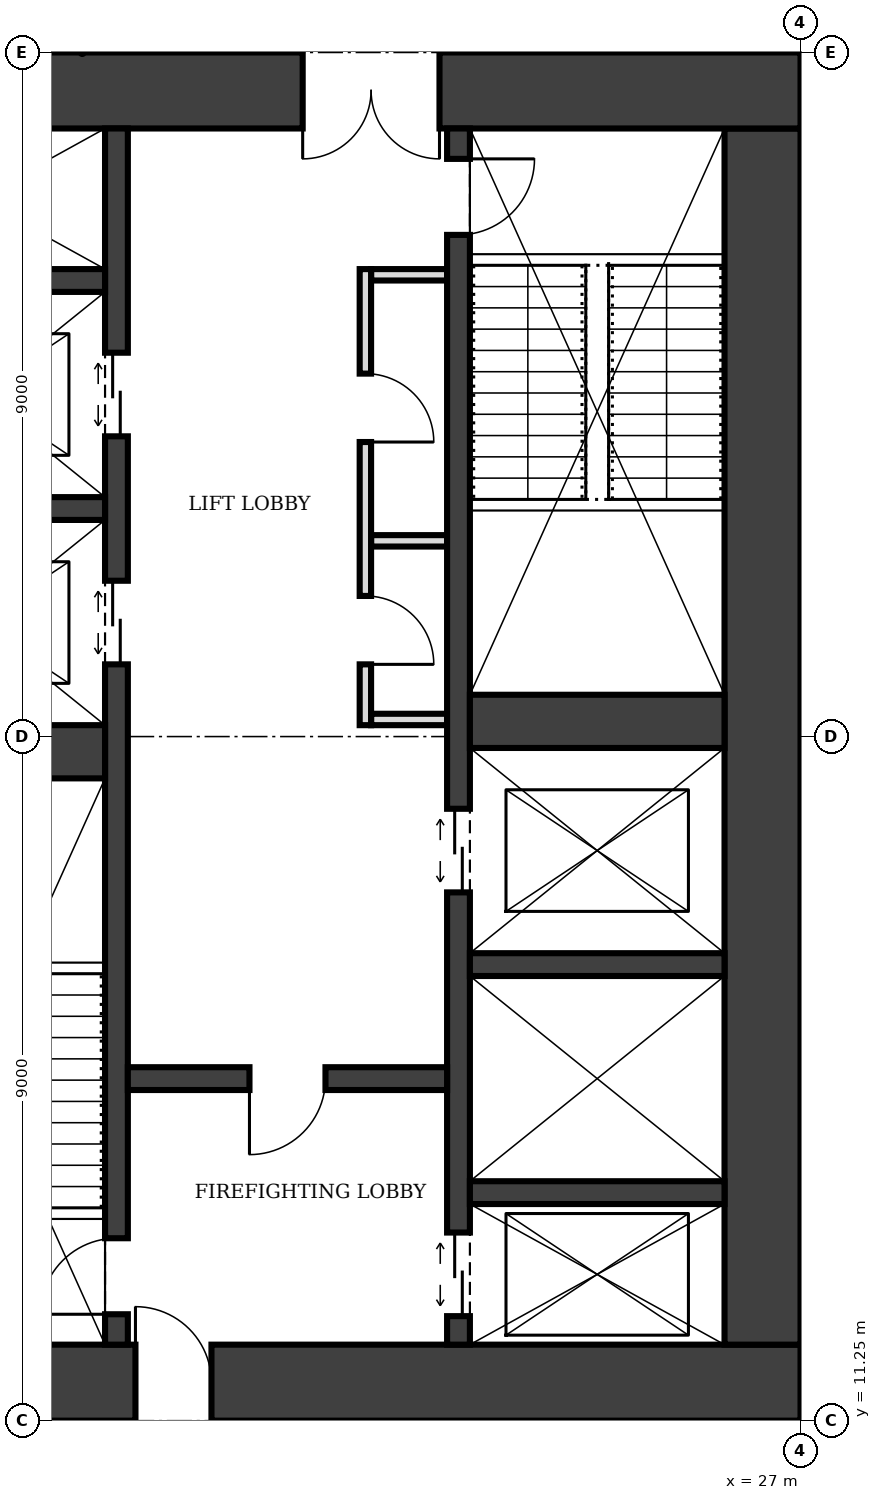
"""IFC4 building model, lengths in metres.
Left out: names, types, materials, properties, quantities, classifications, styles, units other than length and angle.
Written with IfcOpenShell. Run it as: python <this file> out.ifc"""

import sys

from ifc_helpers import new_model, si_unit, direction, frame, frame_2d, origin, place, context, subcontext, project, spatial, rectangle, extrude, element, fill, save


model = new_model("IFC4")
c1 = context("Model", 3, precision=1e-05, world=origin(), true_north=direction((0.0, 1.0)))
c2 = subcontext(c1, "Body", "Model", "MODEL_VIEW")
j1 = project(units=[si_unit("LENGTHUNIT", "METRE"), si_unit("PLANEANGLEUNIT", "RADIAN")], contexts=[c1])
p1 = place(None, origin())
s1 = spatial("IfcSite", under=j1, at=p1, CompositionType="ELEMENT")
p2 = place(p1, origin())
s2 = spatial("IfcBuilding", under=s1, at=p2, CompositionType="ELEMENT")
p3 = place(p2, frame((0.0, 0.0, 45.0)))
s3 = spatial("IfcBuildingStorey", under=s2, at=p3, CompositionType="ELEMENT", Elevation=45.0)
p4 = place(p3, frame((13.5, 11.75, 0.0), z_axis=(0.0, 0.0, 1.0), x_axis=(1.0, 0.0, 0.0)))
e1 = element("IfcWall", 1, at=p4, inside=s3, PredefinedType="SHEAR", context=c2, shape_type="SweptSolid", body=[
    extrude(rectangle(XDim=13.5, YDim=1.0, at=frame_2d((6.75, 0.0))), origin(), (0.0, 0.0, 1.0), 4.0),
])
p5 = place(p4, frame((4.75, 0.0, 0.0)))
e2 = element("IfcOpeningElement", 2, at=p5, cuts=e1, PredefinedType="OPENING", context=c2, shape_type="SweptSolid", body=[
    extrude(rectangle(XDim=1.0, YDim=2.1, at=frame_2d((0.5, 1.05))), frame((0.0, 0.51, 0.0), z_axis=(0.0, -1.0, 0.0), x_axis=(1.0, 0.0, 0.0)), (0.0, 0.0, 1.0), 1.02),
])
p6 = place(p3, frame((26.5, 12.25, 0.0), z_axis=(0.0, 0.0, 1.0), x_axis=(0.0, 1.0, 0.0)))
e3 = element("IfcWall", 3, at=p6, inside=s3, PredefinedType="SHEAR", context=c2, shape_type="SweptSolid", body=[
    extrude(rectangle(XDim=16.0, YDim=1.0, at=frame_2d((8.0, 0.0))), origin(), (0.0, 0.0, 1.0), 4.0),
])
p7 = place(p3, frame((27.0, 28.75, 0.0), z_axis=(0.0, 0.0, 1.0), x_axis=(-1.0, 0.0, 0.0)))
e4 = element("IfcWall", 4, at=p7, inside=s3, PredefinedType="SHEAR", context=c2, shape_type="SweptSolid", body=[
    extrude(rectangle(XDim=13.5, YDim=1.0, at=frame_2d((6.75, 0.0))), origin(), (0.0, 0.0, 1.0), 4.0),
])
p8 = place(p7, frame((4.75, 0.0, 0.0)))
e5 = element("IfcOpeningElement", 5, at=p8, cuts=e4, PredefinedType="OPENING", context=c2, shape_type="SweptSolid", body=[
    extrude(rectangle(XDim=1.8, YDim=2.1, at=frame_2d((0.9, 1.05))), frame((0.0, 0.51, 0.0), z_axis=(0.0, -1.0, 0.0), x_axis=(1.0, 0.0, 0.0)), (0.0, 0.0, 1.0), 1.02),
])
p9 = place(p3, frame((18.0, 12.25, 0.0), z_axis=(0.0, 0.0, 1.0), x_axis=(0.0, 1.0, 0.0)))
e6 = element("IfcWall", 6, at=p9, inside=s3, PredefinedType="SHEAR", context=c2, shape_type="SweptSolid", body=[
    extrude(rectangle(XDim=16.0, YDim=0.3, at=frame_2d((8.0, 0.0))), origin(), (0.0, 0.0, 1.0), 4.0),
])
p10 = place(p9, frame((0.4, 0.0, 0.0)))
e7 = element("IfcOpeningElement", 7, at=p10, cuts=e6, PredefinedType="OPENING", context=c2, shape_type="SweptSolid", body=[
    extrude(rectangle(XDim=1.0, YDim=2.1, at=frame_2d((0.5, 1.05))), frame((0.0, 0.16, 0.0), z_axis=(0.0, -1.0, 0.0), x_axis=(1.0, 0.0, 0.0)), (0.0, 0.0, 1.0), 0.32),
])
p11 = place(p9, frame((8.95, 0.0, 0.0)))
e8 = element("IfcOpeningElement", 8, at=p11, cuts=e6, PredefinedType="OPENING", context=c2, shape_type="SweptSolid", body=[
    extrude(rectangle(XDim=1.1, YDim=2.1, at=frame_2d((0.55, 1.05))), frame((0.0, 0.16, 0.0), z_axis=(0.0, -1.0, 0.0), x_axis=(1.0, 0.0, 0.0)), (0.0, 0.0, 1.0), 0.32),
])
p12 = place(p9, frame((11.95, 0.0, 0.0)))
e9 = element("IfcOpeningElement", 9, at=p12, cuts=e6, PredefinedType="OPENING", context=c2, shape_type="SweptSolid", body=[
    extrude(rectangle(XDim=1.1, YDim=2.1, at=frame_2d((0.55, 1.05))), frame((0.0, 0.16, 0.0), z_axis=(0.0, -1.0, 0.0), x_axis=(1.0, 0.0, 0.0)), (0.0, 0.0, 1.0), 0.32),
])
p13 = place(p3, frame((22.5, 12.25, 0.0), z_axis=(0.0, 0.0, 1.0), x_axis=(0.0, 1.0, 0.0)))
e10 = element("IfcWall", 10, at=p13, inside=s3, PredefinedType="SHEAR", context=c2, shape_type="SweptSolid", body=[
    extrude(rectangle(XDim=16.0, YDim=0.3, at=frame_2d((8.0, 0.0))), origin(), (0.0, 0.0, 1.0), 4.0),
])
p14 = place(p13, frame((14.6, 0.0, 0.0)))
e11 = element("IfcOpeningElement", 11, at=p14, cuts=e10, PredefinedType="OPENING", context=c2, shape_type="SweptSolid", body=[
    extrude(rectangle(XDim=1.0, YDim=2.1, at=frame_2d((0.5, 1.05))), frame((0.0, 0.16, 0.0), z_axis=(0.0, -1.0, 0.0), x_axis=(1.0, 0.0, 0.0)), (0.0, 0.0, 1.0), 0.32),
])
p15 = place(p13, frame((0.375, 0.0, 0.0)))
e12 = element("IfcOpeningElement", 12, at=p15, cuts=e10, PredefinedType="OPENING", context=c2, shape_type="SweptSolid", body=[
    extrude(rectangle(XDim=1.1, YDim=2.1, at=frame_2d((0.55, 1.05))), frame((0.0, 0.16, 0.0), z_axis=(0.0, -1.0, 0.0), x_axis=(1.0, 0.0, 0.0)), (0.0, 0.0, 1.0), 0.32),
])
p16 = place(p13, frame((5.95, 0.0, 0.0)))
e13 = element("IfcOpeningElement", 13, at=p16, cuts=e10, PredefinedType="OPENING", context=c2, shape_type="SweptSolid", body=[
    extrude(rectangle(XDim=1.1, YDim=2.1, at=frame_2d((0.55, 1.05))), frame((0.0, 0.16, 0.0), z_axis=(0.0, -1.0, 0.0), x_axis=(1.0, 0.0, 0.0)), (0.0, 0.0, 1.0), 0.32),
])
p17 = place(p3, frame((14.5, 20.05, 0.0), z_axis=(0.0, 0.0, 1.0), x_axis=(1.0, 0.0, 0.0)))
e14 = element("IfcWall", 14, at=p17, inside=s3, PredefinedType="SHEAR", context=c2, shape_type="SweptSolid", body=[
    extrude(rectangle(XDim=3.35, YDim=0.7, at=frame_2d((1.675, 0.0))), origin(), (0.0, 0.0, 1.0), 4.0),
])
p18 = place(p3, frame((18.15, 15.75, 0.0), z_axis=(0.0, 0.0, 1.0), x_axis=(1.0, 0.0, 0.0)))
e15 = element("IfcWall", 15, at=p18, inside=s3, PredefinedType="SHEAR", context=c2, shape_type="SweptSolid", body=[
    extrude(rectangle(XDim=4.2, YDim=0.3, at=frame_2d((2.1, 0.0))), origin(), (0.0, 0.0, 1.0), 4.0),
])
p19 = place(p18, frame((1.6, 0.0, 0.0)))
e16 = element("IfcOpeningElement", 16, at=p19, cuts=e15, PredefinedType="OPENING", context=c2, shape_type="SweptSolid", body=[
    extrude(rectangle(XDim=1.0, YDim=2.1, at=frame_2d((0.5, 1.05))), frame((0.0, 0.16, 0.0), z_axis=(0.0, -1.0, 0.0), x_axis=(1.0, 0.0, 0.0)), (0.0, 0.0, 1.0), 0.32),
])
for number, where, z_axis, x_axis in (
    (17, (22.65, 14.25, 0.0), (0.0, 0.0, 1.0), (1.0, 0.0, 0.0)),
    (18, (22.65, 17.25, 0.0), (0.0, 0.0, 1.0), (1.0, 0.0, 0.0)),
):
    element("IfcWall", number, at=place(p3, frame(where, z_axis=z_axis, x_axis=x_axis)), inside=s3, PredefinedType="SHEAR", context=c2, shape_type="SweptSolid", body=[
        extrude(rectangle(XDim=3.35, YDim=0.3, at=frame_2d((1.675, 0.0))), origin(), (0.0, 0.0, 1.0), 4.0),
    ])
p20 = place(p3, frame((22.65, 20.45, 0.0), z_axis=(0.0, 0.0, 1.0), x_axis=(1.0, 0.0, 0.0)))
e19 = element("IfcWall", 19, at=p20, inside=s3, PredefinedType="SHEAR", context=c2, shape_type="SweptSolid", body=[
    extrude(rectangle(XDim=3.35, YDim=0.7, at=frame_2d((1.675, 0.0))), origin(), (0.0, 0.0, 1.0), 4.0),
])
for number, where, z_axis, x_axis in (
    (20, (14.5, 23.25, 0.0), (0.0, 0.0, 1.0), (1.0, 0.0, 0.0)),
    (21, (14.5, 26.25, 0.0), (0.0, 0.0, 1.0), (1.0, 0.0, 0.0)),
):
    element("IfcWall", number, at=place(p3, frame(where, z_axis=z_axis, x_axis=x_axis)), inside=s3, PredefinedType="SHEAR", context=c2, shape_type="SweptSolid", body=[
        extrude(rectangle(XDim=3.35, YDim=0.3, at=frame_2d((1.675, 0.0))), origin(), (0.0, 0.0, 1.0), 4.0),
    ])
p21 = place(p3, frame((21.275, 20.4, 0.0), z_axis=(0.0, 0.0, 1.0), x_axis=(0.0, 1.0, 0.0)))
e22 = element("IfcWall", 22, at=p21, inside=s3, PredefinedType="PARTITIONING", context=c2, shape_type="SweptSolid", body=[
    extrude(rectangle(XDim=6.0, YDim=0.15, at=frame_2d((3.0, 0.0))), origin(), (0.0, 0.0, 1.0), 3.75),
])
p22 = place(p21, frame((0.8, 0.0, 0.0)))
e23 = element("IfcOpeningElement", 23, at=p22, cuts=e22, PredefinedType="OPENING", context=c2, shape_type="SweptSolid", body=[
    extrude(rectangle(XDim=0.9, YDim=2.1, at=frame_2d((0.45, 1.05))), frame((0.0, 0.085, 0.0), z_axis=(0.0, -1.0, 0.0), x_axis=(1.0, 0.0, 0.0)), (0.0, 0.0, 1.0), 0.17),
])
p23 = place(p21, frame((3.725, 0.0, 0.0)))
e24 = element("IfcOpeningElement", 24, at=p23, cuts=e22, PredefinedType="OPENING", context=c2, shape_type="SweptSolid", body=[
    extrude(rectangle(XDim=0.9, YDim=2.1, at=frame_2d((0.45, 1.05))), frame((0.0, 0.085, 0.0), z_axis=(0.0, -1.0, 0.0), x_axis=(1.0, 0.0, 0.0)), (0.0, 0.0, 1.0), 0.17),
])
for number, where, z_axis, x_axis in (
    (25, (21.35, 20.475, 0.0), (0.0, 0.0, 1.0), (1.0, 0.0, 0.0)),
    (26, (21.35, 22.825, 0.0), (0.0, 0.0, 1.0), (1.0, 0.0, 0.0)),
    (27, (21.35, 26.325, 0.0), (0.0, 0.0, 1.0), (1.0, 0.0, 0.0)),
):
    element("IfcWall", number, at=place(p3, frame(where, z_axis=z_axis, x_axis=x_axis)), inside=s3, PredefinedType="PARTITIONING", context=c2, shape_type="SweptSolid", body=[
        extrude(rectangle(XDim=1.0, YDim=0.15, at=frame_2d((0.5, 0.0))), origin(), (0.0, 0.0, 1.0), 3.75),
    ])
p24 = place(p5, origin())
e28 = element("IfcDoor", 28, at=p24, inside=s3, OperationType="SINGLE_SWING_LEFT", PredefinedType="DOOR", context=c2, shape_type="SweptSolid", body=[
    extrude(rectangle(XDim=1.0, YDim=2.1, at=frame_2d((0.5, 1.05))), frame((0.0, 0.025, 0.0), z_axis=(0.0, -1.0, 0.0), x_axis=(1.0, 0.0, 0.0)), (0.0, 0.0, 1.0), 0.05),
])
fill(e2, e28)
p25 = place(p8, origin())
e29 = element("IfcDoor", 29, at=p25, inside=s3, OperationType="DOUBLE_DOOR_SINGLE_SWING", PredefinedType="DOOR", context=c2, shape_type="SweptSolid", body=[
    extrude(rectangle(XDim=1.8, YDim=2.1, at=frame_2d((0.9, 1.05))), frame((0.0, 0.025, 0.0), z_axis=(0.0, -1.0, 0.0), x_axis=(1.0, 0.0, 0.0)), (0.0, 0.0, 1.0), 0.05),
])
fill(e5, e29)
p26 = place(p19, frame((1.0, 0.0, 0.0), z_axis=(0.0, 0.0, 1.0), x_axis=(-1.0, 0.0, 0.0)))
e30 = element("IfcDoor", 30, at=p26, inside=s3, OperationType="SINGLE_SWING_RIGHT", PredefinedType="DOOR", context=c2, shape_type="SweptSolid", body=[
    extrude(rectangle(XDim=1.0, YDim=2.1, at=frame_2d((0.5, 1.05))), frame((0.0, 0.025, 0.0), z_axis=(0.0, -1.0, 0.0), x_axis=(1.0, 0.0, 0.0)), (0.0, 0.0, 1.0), 0.05),
])
fill(e16, e30)
p27 = place(p10, origin())
e31 = element("IfcDoor", 31, at=p27, inside=s3, OperationType="SINGLE_SWING_LEFT", PredefinedType="DOOR", context=c2, shape_type="SweptSolid", body=[
    extrude(rectangle(XDim=1.0, YDim=2.1, at=frame_2d((0.5, 1.05))), frame((0.0, 0.025, 0.0), z_axis=(0.0, -1.0, 0.0), x_axis=(1.0, 0.0, 0.0)), (0.0, 0.0, 1.0), 0.05),
])
fill(e7, e31)
p28 = place(p14, frame((1.0, 0.0, 0.0), z_axis=(0.0, 0.0, 1.0), x_axis=(-1.0, 0.0, 0.0)))
e32 = element("IfcDoor", 32, at=p28, inside=s3, OperationType="SINGLE_SWING_LEFT", PredefinedType="DOOR", context=c2, shape_type="SweptSolid", body=[
    extrude(rectangle(XDim=1.0, YDim=2.1, at=frame_2d((0.5, 1.05))), frame((0.0, 0.025, 0.0), z_axis=(0.0, -1.0, 0.0), x_axis=(1.0, 0.0, 0.0)), (0.0, 0.0, 1.0), 0.05),
])
fill(e11, e32)
p29 = place(p15, origin())
e33 = element("IfcDoor", 33, at=p29, inside=s3, OperationType="DOUBLE_DOOR_SLIDING", PredefinedType="DOOR", context=c2, shape_type="SweptSolid", body=[
    extrude(rectangle(XDim=1.1, YDim=2.1, at=frame_2d((0.55, 1.05))), frame((0.0, 0.025, 0.0), z_axis=(0.0, -1.0, 0.0), x_axis=(1.0, 0.0, 0.0)), (0.0, 0.0, 1.0), 0.05),
])
fill(e12, e33)
p30 = place(p11, origin())
e34 = element("IfcDoor", 34, at=p30, inside=s3, OperationType="DOUBLE_DOOR_SLIDING", PredefinedType="DOOR", context=c2, shape_type="SweptSolid", body=[
    extrude(rectangle(XDim=1.1, YDim=2.1, at=frame_2d((0.55, 1.05))), frame((0.0, 0.025, 0.0), z_axis=(0.0, -1.0, 0.0), x_axis=(1.0, 0.0, 0.0)), (0.0, 0.0, 1.0), 0.05),
])
fill(e8, e34)
p31 = place(p12, origin())
e35 = element("IfcDoor", 35, at=p31, inside=s3, OperationType="DOUBLE_DOOR_SLIDING", PredefinedType="DOOR", context=c2, shape_type="SweptSolid", body=[
    extrude(rectangle(XDim=1.1, YDim=2.1, at=frame_2d((0.55, 1.05))), frame((0.0, 0.025, 0.0), z_axis=(0.0, -1.0, 0.0), x_axis=(1.0, 0.0, 0.0)), (0.0, 0.0, 1.0), 0.05),
])
fill(e9, e35)
p32 = place(p16, origin())
e36 = element("IfcDoor", 36, at=p32, inside=s3, OperationType="DOUBLE_DOOR_SLIDING", PredefinedType="DOOR", context=c2, shape_type="SweptSolid", body=[
    extrude(rectangle(XDim=1.1, YDim=2.1, at=frame_2d((0.55, 1.05))), frame((0.0, 0.025, 0.0), z_axis=(0.0, -1.0, 0.0), x_axis=(1.0, 0.0, 0.0)), (0.0, 0.0, 1.0), 0.05),
])
fill(e13, e36)
p33 = place(p22, frame((0.9, 0.0, 0.0), z_axis=(0.0, 0.0, 1.0), x_axis=(-1.0, 0.0, 0.0)))
e37 = element("IfcDoor", 37, at=p33, inside=s3, OperationType="SINGLE_SWING_RIGHT", PredefinedType="DOOR", context=c2, shape_type="SweptSolid", body=[
    extrude(rectangle(XDim=0.9, YDim=2.1, at=frame_2d((0.45, 1.05))), frame((0.0, 0.025, 0.0), z_axis=(0.0, -1.0, 0.0), x_axis=(1.0, 0.0, 0.0)), (0.0, 0.0, 1.0), 0.05),
])
fill(e23, e37)
p34 = place(p23, frame((0.9, 0.0, 0.0), z_axis=(0.0, 0.0, 1.0), x_axis=(-1.0, 0.0, 0.0)))
e38 = element("IfcDoor", 38, at=p34, inside=s3, OperationType="SINGLE_SWING_RIGHT", PredefinedType="DOOR", context=c2, shape_type="SweptSolid", body=[
    extrude(rectangle(XDim=0.9, YDim=2.1, at=frame_2d((0.45, 1.05))), frame((0.0, 0.025, 0.0), z_axis=(0.0, -1.0, 0.0), x_axis=(1.0, 0.0, 0.0)), (0.0, 0.0, 1.0), 0.05),
])
fill(e24, e38)
save(model, sys.argv[1])
